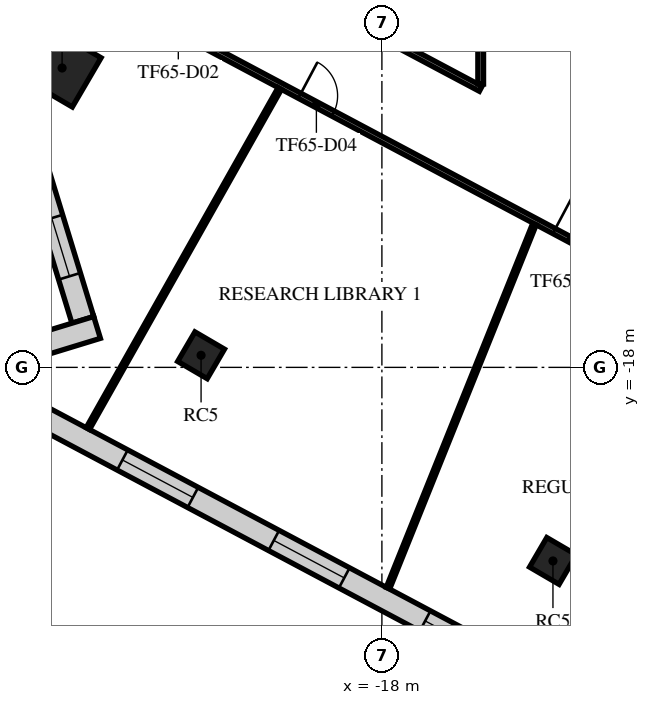
"""IFC4 building model, lengths in metres.
Left out: names, types, materials, properties, quantities, classifications, styles, units other than length and angle.
Written with IfcOpenShell. Run it as: python <this file> out.ifc"""

import sys

from ifc_helpers import new_model, si_unit, direction, frame, frame_2d, origin, origin_2d, place, context, subcontext, project, spatial, rectangle, extrude, element, fill, save


model = new_model("IFC4")
c1 = context("Model", 3, precision=1e-05, world=origin(), true_north=direction((0.0, 1.0)))
c2 = subcontext(c1, "Body", "Model", "MODEL_VIEW")
j1 = project(units=[si_unit("LENGTHUNIT", "METRE"), si_unit("PLANEANGLEUNIT", "RADIAN")], contexts=[c1])
p1 = place(None, origin())
s1 = spatial("IfcSite", under=j1, at=p1, CompositionType="ELEMENT")
p2 = place(p1, origin())
s2 = spatial("IfcBuilding", under=s1, at=p2, CompositionType="ELEMENT")
p3 = place(p2, frame((0.0, 0.0, 274.9)))
s3 = spatial("IfcBuildingStorey", under=s2, at=p3, CompositionType="ELEMENT", Elevation=274.9)
p4 = place(p3, frame((-26.415, -10.122, 0.0), z_axis=(0.0, 0.0, 1.0), x_axis=(0.504643651291, 0.863327739165, 0.0)))
e1 = element("IfcColumn", 1, at=p4, inside=s3, PredefinedType="COLUMN", context=c2, shape_type="SweptSolid", body=[
    extrude(rectangle(XDim=1.5, YDim=1.5, at=origin_2d()), origin(), (0.0, 0.0, 1.0), 4.0),
])
for number, where, z_axis, x_axis in (
    (2, (-22.758, -17.682, 0.0), (0.0, 0.0, 1.0), (0.505, 0.863, 0.0)),
    (3, (-13.499, -23.094, 0.0), (0.0, 0.0, 1.0), (0.505, 0.863, 0.0)),
):
    element("IfcColumn", number, at=place(p3, frame(where, z_axis=z_axis, x_axis=x_axis)), inside=s3, PredefinedType="COLUMN", context=c2, shape_type="SweptSolid", body=[
        extrude(rectangle(XDim=0.9, YDim=0.9, at=origin_2d()), origin(), (0.0, 0.0, 1.0), 4.0),
    ])
p5 = place(p3, frame((-9.159, 32.618, 0.0), z_axis=(0.0, 0.0, 1.0), x_axis=(-0.469470468388, -0.88294817476, 0.0)))
e4 = element("IfcWall", 4, at=p5, inside=s3, PredefinedType="STANDARD", context=c2, shape_type="SweptSolid", body=[
    extrude(rectangle(XDim=48.843, YDim=0.6, at=frame_2d((24.422, 0.0))), origin(), (0.0, 0.0, 1.0), 3.64),
])
p6 = place(p5, frame((1.22, 0.0, 0.9)))
e5 = element("IfcOpeningElement", 5, at=p6, cuts=e4, PredefinedType="OPENING", context=c2, shape_type="SweptSolid", body=[
    extrude(rectangle(XDim=2.0, YDim=2.1, at=frame_2d((1.0, 1.05))), frame((0.0, 0.31, 0.0), z_axis=(0.0, -1.0, 0.0), x_axis=(1.0, 0.0, 0.0)), (0.0, 0.0, 1.0), 0.62),
])
p7 = place(p5, frame((5.66, 0.0, 0.9)))
e6 = element("IfcOpeningElement", 6, at=p7, cuts=e4, PredefinedType="OPENING", context=c2, shape_type="SweptSolid", body=[
    extrude(rectangle(XDim=2.0, YDim=2.1, at=frame_2d((1.0, 1.05))), frame((0.0, 0.31, 0.0), z_axis=(0.0, -1.0, 0.0), x_axis=(1.0, 0.0, 0.0)), (0.0, 0.0, 1.0), 0.62),
])
p8 = place(p5, frame((10.101, 0.0, 0.9)))
e7 = element("IfcOpeningElement", 7, at=p8, cuts=e4, PredefinedType="OPENING", context=c2, shape_type="SweptSolid", body=[
    extrude(rectangle(XDim=2.0, YDim=2.1, at=frame_2d((1.0, 1.05))), frame((0.0, 0.31, 0.0), z_axis=(0.0, -1.0, 0.0), x_axis=(1.0, 0.0, 0.0)), (0.0, 0.0, 1.0), 0.62),
])
p9 = place(p5, frame((14.541, 0.0, 0.9)))
e8 = element("IfcOpeningElement", 8, at=p9, cuts=e4, PredefinedType="OPENING", context=c2, shape_type="SweptSolid", body=[
    extrude(rectangle(XDim=2.0, YDim=2.1, at=frame_2d((1.0, 1.05))), frame((0.0, 0.31, 0.0), z_axis=(0.0, -1.0, 0.0), x_axis=(1.0, 0.0, 0.0)), (0.0, 0.0, 1.0), 0.62),
])
p10 = place(p5, frame((18.981, 0.0, 0.9)))
e9 = element("IfcOpeningElement", 9, at=p10, cuts=e4, PredefinedType="OPENING", context=c2, shape_type="SweptSolid", body=[
    extrude(rectangle(XDim=2.0, YDim=2.1, at=frame_2d((1.0, 1.05))), frame((0.0, 0.31, 0.0), z_axis=(0.0, -1.0, 0.0), x_axis=(1.0, 0.0, 0.0)), (0.0, 0.0, 1.0), 0.62),
])
p11 = place(p5, frame((23.422, 0.0, 0.9)))
e10 = element("IfcOpeningElement", 10, at=p11, cuts=e4, PredefinedType="OPENING", context=c2, shape_type="SweptSolid", body=[
    extrude(rectangle(XDim=2.0, YDim=2.1, at=frame_2d((1.0, 1.05))), frame((0.0, 0.31, 0.0), z_axis=(0.0, -1.0, 0.0), x_axis=(1.0, 0.0, 0.0)), (0.0, 0.0, 1.0), 0.62),
])
p12 = place(p5, frame((27.862, 0.0, 0.9)))
e11 = element("IfcOpeningElement", 11, at=p12, cuts=e4, PredefinedType="OPENING", context=c2, shape_type="SweptSolid", body=[
    extrude(rectangle(XDim=2.0, YDim=2.1, at=frame_2d((1.0, 1.05))), frame((0.0, 0.31, 0.0), z_axis=(0.0, -1.0, 0.0), x_axis=(1.0, 0.0, 0.0)), (0.0, 0.0, 1.0), 0.62),
])
p13 = place(p5, frame((32.302, 0.0, 0.9)))
e12 = element("IfcOpeningElement", 12, at=p13, cuts=e4, PredefinedType="OPENING", context=c2, shape_type="SweptSolid", body=[
    extrude(rectangle(XDim=2.0, YDim=2.1, at=frame_2d((1.0, 1.05))), frame((0.0, 0.31, 0.0), z_axis=(0.0, -1.0, 0.0), x_axis=(1.0, 0.0, 0.0)), (0.0, 0.0, 1.0), 0.62),
])
p14 = place(p5, frame((36.742, 0.0, 0.9)))
e13 = element("IfcOpeningElement", 13, at=p14, cuts=e4, PredefinedType="OPENING", context=c2, shape_type="SweptSolid", body=[
    extrude(rectangle(XDim=2.0, YDim=2.1, at=frame_2d((1.0, 1.05))), frame((0.0, 0.31, 0.0), z_axis=(0.0, -1.0, 0.0), x_axis=(1.0, 0.0, 0.0)), (0.0, 0.0, 1.0), 0.62),
])
p15 = place(p5, frame((41.183, 0.0, 0.9)))
e14 = element("IfcOpeningElement", 14, at=p15, cuts=e4, PredefinedType="OPENING", context=c2, shape_type="SweptSolid", body=[
    extrude(rectangle(XDim=2.0, YDim=2.1, at=frame_2d((1.0, 1.05))), frame((0.0, 0.31, 0.0), z_axis=(0.0, -1.0, 0.0), x_axis=(1.0, 0.0, 0.0)), (0.0, 0.0, 1.0), 0.62),
])
p16 = place(p5, frame((45.623, 0.0, 0.9)))
e15 = element("IfcOpeningElement", 15, at=p16, cuts=e4, PredefinedType="OPENING", context=c2, shape_type="SweptSolid", body=[
    extrude(rectangle(XDim=2.0, YDim=2.1, at=frame_2d((1.0, 1.05))), frame((0.0, 0.31, 0.0), z_axis=(0.0, -1.0, 0.0), x_axis=(1.0, 0.0, 0.0)), (0.0, 0.0, 1.0), 0.62),
])
p17 = place(p3, frame((-28.208, -9.1, 0.0), z_axis=(0.0, 0.0, 1.0), x_axis=(0.292389102139, -0.956299436866, 0.0)))
e16 = element("IfcWall", 16, at=p17, inside=s3, PredefinedType="STANDARD", context=c2, shape_type="SweptSolid", body=[
    extrude(rectangle(XDim=8.0, YDim=0.6, at=frame_2d((4.0, 0.0))), origin(), (0.0, 0.0, 1.0), 3.64),
])
p18 = place(p17, frame((5.2, 0.0, 0.9)))
e17 = element("IfcOpeningElement", 17, at=p18, cuts=e16, PredefinedType="OPENING", context=c2, shape_type="SweptSolid", body=[
    extrude(rectangle(XDim=1.6, YDim=2.1, at=frame_2d((0.8, 1.05))), frame((0.0, 0.31, 0.0), z_axis=(0.0, -1.0, 0.0), x_axis=(1.0, 0.0, 0.0)), (0.0, 0.0, 1.0), 0.62),
])
p19 = place(p3, frame((-25.495, -16.949, 0.0), z_axis=(0.0, 0.0, 1.0), x_axis=(-0.956292267386, -0.292412549899, 0.0)))
e18 = element("IfcWall", 18, at=p19, inside=s3, PredefinedType="STANDARD", context=c2, shape_type="SweptSolid", body=[
    extrude(rectangle(XDim=4.635, YDim=0.6, at=frame_2d((2.318, 0.0))), origin(), (0.0, 0.0, 1.0), 3.64),
])
p20 = place(p19, frame((1.818, 0.0, 0.9)))
e19 = element("IfcOpeningElement", 19, at=p20, cuts=e18, PredefinedType="OPENING", context=c2, shape_type="SweptSolid", body=[
    extrude(rectangle(XDim=1.6, YDim=2.1, at=frame_2d((0.8, 1.05))), frame((0.0, 0.31, 0.0), z_axis=(0.0, -1.0, 0.0), x_axis=(1.0, 0.0, 0.0)), (0.0, 0.0, 1.0), 0.62),
])
p21 = place(p3, frame((-29.875, -17.753, 0.0), z_axis=(0.0, 0.0, 1.0), x_axis=(0.882945726539, -0.469475072806, 0.0)))
e20 = element("IfcWall", 20, at=p21, inside=s3, PredefinedType="STANDARD", context=c2, shape_type="SweptSolid", body=[
    extrude(rectangle(XDim=36.086, YDim=0.6, at=frame_2d((18.043, 0.0))), origin(), (0.0, 0.0, 1.0), 3.64),
])
p22 = place(p21, frame((1.205, 0.0, 0.9)))
e21 = element("IfcOpeningElement", 21, at=p22, cuts=e20, PredefinedType="OPENING", context=c2, shape_type="SweptSolid", body=[
    extrude(rectangle(XDim=2.1, YDim=2.1, at=frame_2d((1.05, 1.05))), frame((0.0, 0.31, 0.0), z_axis=(0.0, -1.0, 0.0), x_axis=(1.0, 0.0, 0.0)), (0.0, 0.0, 1.0), 0.62),
])
p23 = place(p21, frame((5.716, 0.0, 0.9)))
e22 = element("IfcOpeningElement", 22, at=p23, cuts=e20, PredefinedType="OPENING", context=c2, shape_type="SweptSolid", body=[
    extrude(rectangle(XDim=2.1, YDim=2.1, at=frame_2d((1.05, 1.05))), frame((0.0, 0.31, 0.0), z_axis=(0.0, -1.0, 0.0), x_axis=(1.0, 0.0, 0.0)), (0.0, 0.0, 1.0), 0.62),
])
p24 = place(p21, frame((10.227, 0.0, 0.9)))
e23 = element("IfcOpeningElement", 23, at=p24, cuts=e20, PredefinedType="OPENING", context=c2, shape_type="SweptSolid", body=[
    extrude(rectangle(XDim=2.1, YDim=2.1, at=frame_2d((1.05, 1.05))), frame((0.0, 0.31, 0.0), z_axis=(0.0, -1.0, 0.0), x_axis=(1.0, 0.0, 0.0)), (0.0, 0.0, 1.0), 0.62),
])
p25 = place(p21, frame((14.738, 0.0, 0.9)))
e24 = element("IfcOpeningElement", 24, at=p25, cuts=e20, PredefinedType="OPENING", context=c2, shape_type="SweptSolid", body=[
    extrude(rectangle(XDim=2.1, YDim=2.1, at=frame_2d((1.05, 1.05))), frame((0.0, 0.31, 0.0), z_axis=(0.0, -1.0, 0.0), x_axis=(1.0, 0.0, 0.0)), (0.0, 0.0, 1.0), 0.62),
])
p26 = place(p21, frame((19.249, 0.0, 0.9)))
e25 = element("IfcOpeningElement", 25, at=p26, cuts=e20, PredefinedType="OPENING", context=c2, shape_type="SweptSolid", body=[
    extrude(rectangle(XDim=2.1, YDim=2.1, at=frame_2d((1.05, 1.05))), frame((0.0, 0.31, 0.0), z_axis=(0.0, -1.0, 0.0), x_axis=(1.0, 0.0, 0.0)), (0.0, 0.0, 1.0), 0.62),
])
p27 = place(p21, frame((23.759, 0.0, 0.9)))
e26 = element("IfcOpeningElement", 26, at=p27, cuts=e20, PredefinedType="OPENING", context=c2, shape_type="SweptSolid", body=[
    extrude(rectangle(XDim=2.1, YDim=2.1, at=frame_2d((1.05, 1.05))), frame((0.0, 0.31, 0.0), z_axis=(0.0, -1.0, 0.0), x_axis=(1.0, 0.0, 0.0)), (0.0, 0.0, 1.0), 0.62),
])
p28 = place(p21, frame((28.27, 0.0, 0.9)))
e27 = element("IfcOpeningElement", 27, at=p28, cuts=e20, PredefinedType="OPENING", context=c2, shape_type="SweptSolid", body=[
    extrude(rectangle(XDim=2.1, YDim=2.1, at=frame_2d((1.05, 1.05))), frame((0.0, 0.31, 0.0), z_axis=(0.0, -1.0, 0.0), x_axis=(1.0, 0.0, 0.0)), (0.0, 0.0, 1.0), 0.62),
])
p29 = place(p21, frame((32.781, 0.0, 0.9)))
e28 = element("IfcOpeningElement", 28, at=p29, cuts=e20, PredefinedType="OPENING", context=c2, shape_type="SweptSolid", body=[
    extrude(rectangle(XDim=2.1, YDim=2.1, at=frame_2d((1.05, 1.05))), frame((0.0, 0.31, 0.0), z_axis=(0.0, -1.0, 0.0), x_axis=(1.0, 0.0, 0.0)), (0.0, 0.0, 1.0), 0.62),
])
p30 = place(p3, frame((-26.271, -7.606, 0.0), z_axis=(0.0, 0.0, 1.0), x_axis=(0.882946860375, -0.469472940385, 0.0)))
e29 = element("IfcWall", 29, at=p30, inside=s3, PredefinedType="PARTITIONING", context=c2, shape_type="SweptSolid", body=[
    extrude(rectangle(XDim=39.325, YDim=0.15, at=frame_2d((19.662, 0.0))), origin(), (0.0, 0.0, 1.0), 3.04),
])
p31 = place(p30, frame((2.8, 0.0, 0.0)))
e30 = element("IfcOpeningElement", 30, at=p31, cuts=e29, PredefinedType="OPENING", context=c2, shape_type="SweptSolid", body=[
    extrude(rectangle(XDim=1.0, YDim=2.1, at=frame_2d((0.5, 1.05))), frame((0.0, 0.085, 0.0), z_axis=(0.0, -1.0, 0.0), x_axis=(1.0, 0.0, 0.0)), (0.0, 0.0, 1.0), 0.17),
])
p32 = place(p30, frame((6.915, 0.0, 0.0)))
e31 = element("IfcOpeningElement", 31, at=p32, cuts=e29, PredefinedType="OPENING", context=c2, shape_type="SweptSolid", body=[
    extrude(rectangle(XDim=1.0, YDim=2.1, at=frame_2d((0.5, 1.05))), frame((0.0, 0.085, 0.0), z_axis=(0.0, -1.0, 0.0), x_axis=(1.0, 0.0, 0.0)), (0.0, 0.0, 1.0), 0.17),
])
p33 = place(p30, frame((14.499, 0.0, 0.0)))
e32 = element("IfcOpeningElement", 32, at=p33, cuts=e29, PredefinedType="OPENING", context=c2, shape_type="SweptSolid", body=[
    extrude(rectangle(XDim=1.0, YDim=2.1, at=frame_2d((0.5, 1.05))), frame((0.0, 0.085, 0.0), z_axis=(0.0, -1.0, 0.0), x_axis=(1.0, 0.0, 0.0)), (0.0, 0.0, 1.0), 0.17),
])
p34 = place(p30, frame((25.785, 0.0, 0.0)))
e33 = element("IfcOpeningElement", 33, at=p34, cuts=e29, PredefinedType="OPENING", context=c2, shape_type="SweptSolid", body=[
    extrude(rectangle(XDim=1.0, YDim=2.1, at=frame_2d((0.5, 1.05))), frame((0.0, 0.085, 0.0), z_axis=(0.0, -1.0, 0.0), x_axis=(1.0, 0.0, 0.0)), (0.0, 0.0, 1.0), 0.17),
])
p35 = place(p30, frame((37.741, 0.0, 0.0)))
e34 = element("IfcOpeningElement", 34, at=p35, cuts=e29, PredefinedType="OPENING", context=c2, shape_type="SweptSolid", body=[
    extrude(rectangle(XDim=1.0, YDim=2.1, at=frame_2d((0.5, 1.05))), frame((0.0, 0.085, 0.0), z_axis=(0.0, -1.0, 0.0), x_axis=(1.0, 0.0, 0.0)), (0.0, 0.0, 1.0), 0.17),
])
p36 = place(p3, frame((-25.144, -5.487, 0.0), z_axis=(0.0, 0.0, 1.0), x_axis=(0.882957268676, -0.469453364769, 0.0)))
e35 = element("IfcWall", 35, at=p36, inside=s3, PredefinedType="PARTITIONING", context=c2, shape_type="SweptSolid", body=[
    extrude(rectangle(XDim=11.036, YDim=0.15, at=frame_2d((5.518, 0.0))), origin(), (0.0, 0.0, 1.0), 3.24),
])
p37 = place(p3, frame((-15.4, -10.543, 0.0), z_axis=(0.0, 0.0, 1.0), x_axis=(0.0, 1.0, 0.0)))
e36 = element("IfcWall", 36, at=p37, inside=s3, PredefinedType="PARTITIONING", context=c2, shape_type="SweptSolid", body=[
    extrude(rectangle(XDim=25.943, YDim=0.15, at=frame_2d((12.972, 0.0))), origin(), (0.0, 0.0, 1.0), 3.24),
])
p38 = place(p37, frame((7.55, 0.0, 0.0)))
e37 = element("IfcOpeningElement", 37, at=p38, cuts=e36, PredefinedType="OPENING", context=c2, shape_type="SweptSolid", body=[
    extrude(rectangle(XDim=1.8, YDim=2.1, at=frame_2d((0.9, 1.05))), frame((0.0, 0.085, 0.0), z_axis=(0.0, -1.0, 0.0), x_axis=(1.0, 0.0, 0.0)), (0.0, 0.0, 1.0), 0.17),
])
p39 = place(p37, frame((13.164, 0.0, 0.0)))
e38 = element("IfcOpeningElement", 38, at=p39, cuts=e36, PredefinedType="OPENING", context=c2, shape_type="SweptSolid", body=[
    extrude(rectangle(XDim=1.0, YDim=2.1, at=frame_2d((0.5, 1.05))), frame((0.0, 0.085, 0.0), z_axis=(0.0, -1.0, 0.0), x_axis=(1.0, 0.0, 0.0)), (0.0, 0.0, 1.0), 0.17),
])
p40 = place(p37, frame((22.088, 0.0, 0.0)))
e39 = element("IfcOpeningElement", 39, at=p40, cuts=e36, PredefinedType="OPENING", context=c2, shape_type="SweptSolid", body=[
    extrude(rectangle(XDim=1.0, YDim=2.1, at=frame_2d((0.5, 1.05))), frame((0.0, 0.085, 0.0), z_axis=(0.0, -1.0, 0.0), x_axis=(1.0, 0.0, 0.0)), (0.0, 0.0, 1.0), 0.17),
])
p41 = place(p3, frame((-25.737, -19.611, 0.0), z_axis=(0.0, 0.0, 1.0), x_axis=(0.491415925423, 0.870925018725, 0.0)))
e40 = element("IfcWall", 40, at=p41, inside=s3, PredefinedType="PARTITIONING", context=c2, shape_type="SweptSolid", body=[
    extrude(rectangle(XDim=10.276, YDim=0.1, at=frame_2d((5.138, 0.0))), origin(), (0.0, 0.0, 1.0), 3.04),
])
p42 = place(p3, frame((-17.84, -23.81, 0.0), z_axis=(0.0, 0.0, 1.0), x_axis=(0.373322071297, 0.927701800732, 0.0)))
e41 = element("IfcWall", 41, at=p42, inside=s3, PredefinedType="PARTITIONING", context=c2, shape_type="SweptSolid", body=[
    extrude(rectangle(XDim=10.326, YDim=0.1, at=frame_2d((5.163, 0.0))), origin(), (0.0, 0.0, 1.0), 3.04),
])
p43 = place(p18, origin())
e42 = element("IfcWindow", 42, at=p43, inside=s3, PartitioningType="SINGLE_PANEL", PredefinedType="WINDOW", context=c2, shape_type="SweptSolid", body=[
    extrude(rectangle(XDim=1.6, YDim=2.1, at=frame_2d((0.8, 1.05))), frame((0.0, 0.03, 0.0), z_axis=(0.0, -1.0, 0.0), x_axis=(1.0, 0.0, 0.0)), (0.0, 0.0, 1.0), 0.06),
])
fill(e17, e42)
p44 = place(p23, origin())
e43 = element("IfcWindow", 43, at=p44, inside=s3, PartitioningType="SINGLE_PANEL", PredefinedType="WINDOW", context=c2, shape_type="SweptSolid", body=[
    extrude(rectangle(XDim=2.1, YDim=2.1, at=frame_2d((1.05, 1.05))), frame((0.0, 0.03, 0.0), z_axis=(0.0, -1.0, 0.0), x_axis=(1.0, 0.0, 0.0)), (0.0, 0.0, 1.0), 0.06),
])
fill(e22, e43)
p45 = place(p24, origin())
e44 = element("IfcWindow", 44, at=p45, inside=s3, PartitioningType="SINGLE_PANEL", PredefinedType="WINDOW", context=c2, shape_type="SweptSolid", body=[
    extrude(rectangle(XDim=2.1, YDim=2.1, at=frame_2d((1.05, 1.05))), frame((0.0, 0.03, 0.0), z_axis=(0.0, -1.0, 0.0), x_axis=(1.0, 0.0, 0.0)), (0.0, 0.0, 1.0), 0.06),
])
fill(e23, e44)
p46 = place(p25, origin())
e45 = element("IfcWindow", 45, at=p46, inside=s3, PartitioningType="SINGLE_PANEL", PredefinedType="WINDOW", context=c2, shape_type="SweptSolid", body=[
    extrude(rectangle(XDim=2.1, YDim=2.1, at=frame_2d((1.05, 1.05))), frame((0.0, 0.03, 0.0), z_axis=(0.0, -1.0, 0.0), x_axis=(1.0, 0.0, 0.0)), (0.0, 0.0, 1.0), 0.06),
])
fill(e24, e45)
p47 = place(p32, frame((1.0, 0.0, 0.0), z_axis=(0.0, 0.0, 1.0), x_axis=(-1.0, 0.0, 0.0)))
e46 = element("IfcDoor", 46, at=p47, inside=s3, OperationType="SINGLE_SWING_RIGHT", PredefinedType="DOOR", context=c2, shape_type="SweptSolid", body=[
    extrude(rectangle(XDim=1.0, YDim=2.1, at=frame_2d((0.5, 1.05))), frame((0.0, 0.025, 0.0), z_axis=(0.0, -1.0, 0.0), x_axis=(1.0, 0.0, 0.0)), (0.0, 0.0, 1.0), 0.05),
])
fill(e31, e46)
p48 = place(p33, frame((1.0, 0.0, 0.0), z_axis=(0.0, 0.0, 1.0), x_axis=(-1.0, 0.0, 0.0)))
e47 = element("IfcDoor", 47, at=p48, inside=s3, OperationType="SINGLE_SWING_RIGHT", PredefinedType="DOOR", context=c2, shape_type="SweptSolid", body=[
    extrude(rectangle(XDim=1.0, YDim=2.1, at=frame_2d((0.5, 1.05))), frame((0.0, 0.025, 0.0), z_axis=(0.0, -1.0, 0.0), x_axis=(1.0, 0.0, 0.0)), (0.0, 0.0, 1.0), 0.05),
])
fill(e32, e47)
save(model, sys.argv[1])
